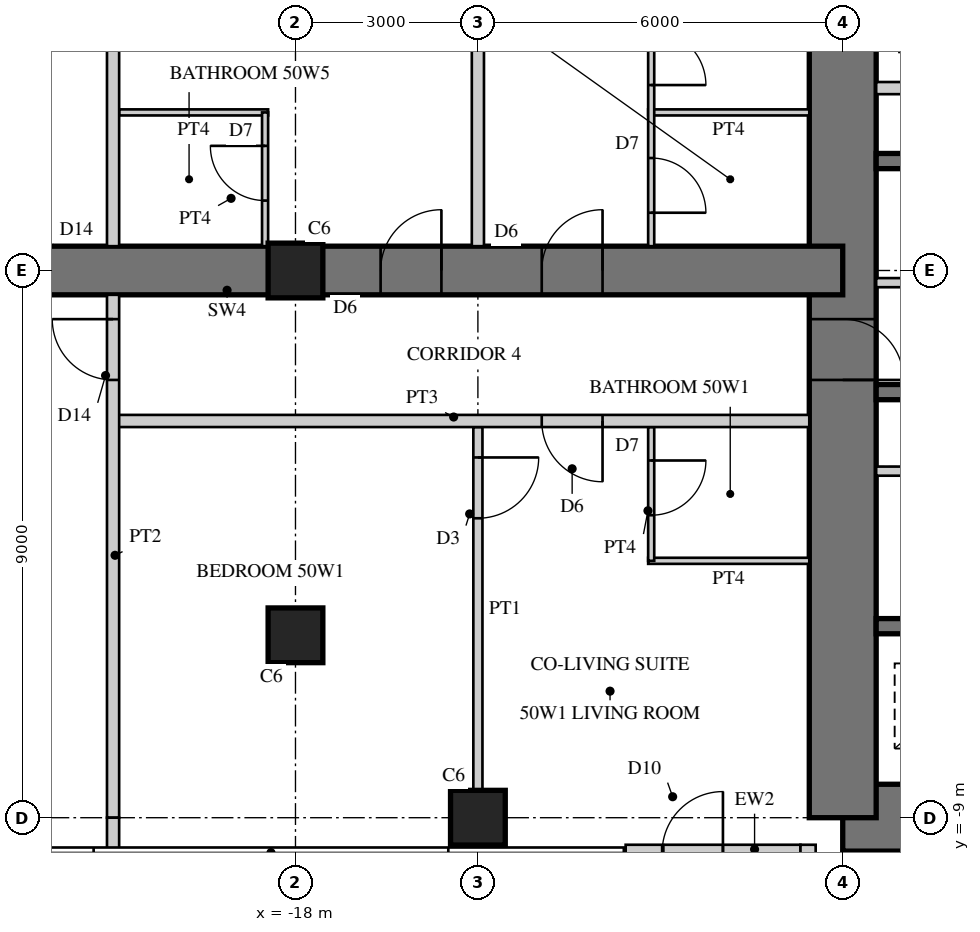
"""IFC4 building model, lengths in metres.
Left out: names, types, materials, properties, quantities, classifications, styles, units other than length and angle.
Written with IfcOpenShell. Run it as: python <this file> out.ifc"""

import sys

from ifc_helpers import new_model, si_unit, direction, frame, frame_2d, origin, origin_2d, place, context, subcontext, project, spatial, rectangle, hollow_rectangle, extrude, element, fill, save


model = new_model("IFC4")
c1 = context("Model", 3, precision=1e-05, world=origin(), true_north=direction((0.0, 1.0)))
c2 = subcontext(c1, "Body", "Model", "MODEL_VIEW")
j1 = project(units=[si_unit("LENGTHUNIT", "METRE"), si_unit("PLANEANGLEUNIT", "RADIAN")], contexts=[c1])
p1 = place(None, origin())
s1 = spatial("IfcSite", under=j1, at=p1, CompositionType="ELEMENT")
p2 = place(p1, origin())
s2 = spatial("IfcBuilding", under=s1, at=p2, CompositionType="ELEMENT")
p3 = place(p2, frame((0.0, 0.0, 200.1)))
s3 = spatial("IfcBuildingStorey", under=s2, at=p3, CompositionType="ELEMENT", Elevation=200.1)
p4 = place(p3, frame((-9.0, -9.0, 0.0), z_axis=(0.0, 0.0, 1.0), x_axis=(1.0, 0.0, 0.0)))
e1 = element("IfcWall", 1, at=p4, inside=s3, PredefinedType="SHEAR", context=c2, shape_type="SweptSolid", body=[
    extrude(rectangle(XDim=18.0, YDim=1.1, at=frame_2d((9.0, 0.0))), origin(), (0.0, 0.0, 1.0), 3.4),
])
p5 = place(p4, frame((9.8, 0.0, 0.0)))
e2 = element("IfcOpeningElement", 2, at=p5, cuts=e1, PredefinedType="OPENING", context=c2, shape_type="SweptSolid", body=[
    extrude(rectangle(XDim=1.0, YDim=2.4, at=frame_2d((0.5, 1.2))), frame((0.0, 0.56, 0.0), z_axis=(0.0, -1.0, 0.0), x_axis=(1.0, 0.0, 0.0)), (0.0, 0.0, 1.0), 1.12),
])
p6 = place(p3, frame((-9.0, 9.0, 0.0), z_axis=(0.0, 0.0, 1.0), x_axis=(0.0, -1.0, 0.0)))
e3 = element("IfcWall", 3, at=p6, inside=s3, PredefinedType="SHEAR", context=c2, shape_type="SweptSolid", body=[
    extrude(rectangle(XDim=18.0, YDim=1.1, at=frame_2d((9.0, 0.0))), origin(), (0.0, 0.0, 1.0), 3.4),
])
p7 = place(p6, frame((9.8, 0.0, 0.0)))
e4 = element("IfcOpeningElement", 4, at=p7, cuts=e3, PredefinedType="OPENING", context=c2, shape_type="SweptSolid", body=[
    extrude(rectangle(XDim=1.0, YDim=2.4, at=frame_2d((0.5, 1.2))), frame((0.0, 0.56, 0.0), z_axis=(0.0, -1.0, 0.0), x_axis=(1.0, 0.0, 0.0)), (0.0, 0.0, 1.0), 1.12),
])
p8 = place(p3, frame((-2.125, 1.8, 0.0), z_axis=(0.0, 0.0, 1.0), x_axis=(-1.0, 0.0, 0.0)))
e5 = element("IfcWall", 5, at=p8, inside=s3, PredefinedType="SHEAR", context=c2, shape_type="SweptSolid", body=[
    extrude(rectangle(XDim=6.325, YDim=0.25, at=frame_2d((3.163, 0.0))), origin(), (0.0, 0.0, 1.0), 3.4),
])
p9 = place(p3, frame((-5.725, 3.0, 0.0), z_axis=(0.0, 0.0, 1.0), x_axis=(-1.0, 0.0, 0.0)))
e6 = element("IfcWall", 6, at=p9, inside=s3, PredefinedType="PARTITIONING", context=c2, shape_type="SweptSolid", body=[
    extrude(rectangle(XDim=2.725, YDim=0.2, at=frame_2d((1.362, 0.0))), origin(), (0.0, 0.0, 1.0), 3.4),
])
p10 = place(p3, frame((-1.925, -2.0, 0.0), z_axis=(0.0, 0.0, 1.0), x_axis=(-1.0, 0.0, 0.0)))
e7 = element("IfcWall", 7, at=p10, inside=s3, PredefinedType="SHEAR", context=c2, shape_type="SweptSolid", body=[
    extrude(rectangle(XDim=6.525, YDim=0.25, at=frame_2d((3.262, 0.0))), origin(), (0.0, 0.0, 1.0), 3.4),
])
p11 = place(p3, frame((-1.925, -5.85, 0.0), z_axis=(0.0, 0.0, 1.0), x_axis=(-1.0, 0.0, 0.0)))
e8 = element("IfcWall", 8, at=p11, inside=s3, PredefinedType="SHEAR", context=c2, shape_type="SweptSolid", body=[
    extrude(rectangle(XDim=6.525, YDim=0.25, at=frame_2d((3.262, 0.0))), origin(), (0.0, 0.0, 1.0), 3.4),
])
p12 = place(p11, frame((0.471, 0.0, 0.0)))
e9 = element("IfcOpeningElement", 9, at=p12, cuts=e8, PredefinedType="OPENING", context=c2, shape_type="SweptSolid", body=[
    extrude(rectangle(XDim=1.1, YDim=2.2, at=frame_2d((0.55, 1.1))), frame((0.0, 0.135, 0.0), z_axis=(0.0, -1.0, 0.0), x_axis=(1.0, 0.0, 0.0)), (0.0, 0.0, 1.0), 0.27),
])
p13 = place(p11, frame((2.712, 0.0, 0.0)))
e10 = element("IfcOpeningElement", 10, at=p13, cuts=e8, PredefinedType="OPENING", context=c2, shape_type="SweptSolid", body=[
    extrude(rectangle(XDim=1.1, YDim=2.2, at=frame_2d((0.55, 1.1))), frame((0.0, 0.135, 0.0), z_axis=(0.0, -1.0, 0.0), x_axis=(1.0, 0.0, 0.0)), (0.0, 0.0, 1.0), 0.27),
])
p14 = place(p11, frame((4.954, 0.0, 0.0)))
e11 = element("IfcOpeningElement", 11, at=p14, cuts=e8, PredefinedType="OPENING", context=c2, shape_type="SweptSolid", body=[
    extrude(rectangle(XDim=1.1, YDim=2.2, at=frame_2d((0.55, 1.1))), frame((0.0, 0.135, 0.0), z_axis=(0.0, -1.0, 0.0), x_axis=(1.0, 0.0, 0.0)), (0.0, 0.0, 1.0), 0.27),
])
p15 = place(p3, frame((-1.925, -3.3, 0.0), z_axis=(0.0, 0.0, 1.0), x_axis=(-1.0, 0.0, 0.0)))
e12 = element("IfcWall", 12, at=p15, inside=s3, PredefinedType="PARTITIONING", context=c2, shape_type="SweptSolid", body=[
    extrude(rectangle(XDim=6.525, YDim=0.15, at=frame_2d((3.262, 0.0))), origin(), (0.0, 0.0, 1.0), 3.4),
])
p16 = place(p15, frame((0.075, 0.0, 0.0)))
e13 = element("IfcOpeningElement", 13, at=p16, cuts=e12, PredefinedType="OPENING", context=c2, shape_type="SweptSolid", body=[
    extrude(rectangle(XDim=0.8, YDim=2.1, at=frame_2d((0.4, 1.05))), frame((0.0, 0.085, 0.0), z_axis=(0.0, -1.0, 0.0), x_axis=(1.0, 0.0, 0.0)), (0.0, 0.0, 1.0), 0.17),
])
p17 = place(p15, frame((3.675, 0.0, 0.0)))
e14 = element("IfcOpeningElement", 14, at=p17, cuts=e12, PredefinedType="OPENING", context=c2, shape_type="SweptSolid", body=[
    extrude(rectangle(XDim=0.8, YDim=2.1, at=frame_2d((0.4, 1.05))), frame((0.0, 0.085, 0.0), z_axis=(0.0, -1.0, 0.0), x_axis=(1.0, 0.0, 0.0)), (0.0, 0.0, 1.0), 0.17),
])
p18 = place(p3, frame((-9.0, 0.0, 0.0), z_axis=(0.0, 0.0, 1.0), x_axis=(-1.0, 0.0, 0.0)))
e15 = element("IfcWall", 15, at=p18, inside=s3, PredefinedType="SHEAR", context=c2, shape_type="SweptSolid", body=[
    extrude(rectangle(XDim=18.0, YDim=0.8, at=frame_2d((9.0, 0.0))), origin(), (0.0, 0.0, 1.0), 3.4),
])
p19 = place(p18, frame((3.95, 0.0, 0.0)))
e16 = element("IfcOpeningElement", 16, at=p19, cuts=e15, PredefinedType="OPENING", context=c2, shape_type="SweptSolid", body=[
    extrude(rectangle(XDim=1.0, YDim=2.15, at=frame_2d((0.5, 1.075))), frame((0.0, 0.41, 0.0), z_axis=(0.0, -1.0, 0.0), x_axis=(1.0, 0.0, 0.0)), (0.0, 0.0, 1.0), 0.82),
])
p20 = place(p18, frame((6.6, 0.0, 0.0)))
e17 = element("IfcOpeningElement", 17, at=p20, cuts=e15, PredefinedType="OPENING", context=c2, shape_type="SweptSolid", body=[
    extrude(rectangle(XDim=1.0, YDim=2.15, at=frame_2d((0.5, 1.075))), frame((0.0, 0.41, 0.0), z_axis=(0.0, -1.0, 0.0), x_axis=(1.0, 0.0, 0.0)), (0.0, 0.0, 1.0), 0.82),
])
p21 = place(p18, frame((13.25, 0.0, 0.0)))
e18 = element("IfcOpeningElement", 18, at=p21, cuts=e15, PredefinedType="OPENING", context=c2, shape_type="SweptSolid", body=[
    extrude(rectangle(XDim=1.0, YDim=2.2, at=frame_2d((0.5, 1.1))), frame((0.0, 0.41, 0.0), z_axis=(0.0, -1.0, 0.0), x_axis=(1.0, 0.0, 0.0)), (0.0, 0.0, 1.0), 0.82),
])
for number, where, z_axis, x_axis in (
    (19, (-15.0, -9.0, 0.0), (0.0, 0.0, 1.0), (1.0, 0.0, 0.0)),
    (20, (-18.0, 0.0, 0.0), (0.0, 0.0, 1.0), (1.0, 0.0, 0.0)),
    (21, (-18.0, -6.0, 0.0), (0.0, 0.0, 1.0), (1.0, 0.0, 0.0)),
):
    element("IfcColumn", number, at=place(p3, frame(where, z_axis=z_axis, x_axis=x_axis)), inside=s3, PredefinedType="COLUMN", context=c2, shape_type="SweptSolid", body=[
        extrude(rectangle(XDim=0.9, YDim=0.9, at=origin_2d()), origin(), (0.0, 0.0, 1.0), 3.4),
    ])
p22 = place(p3, frame((-12.57, -9.57, 0.0), z_axis=(0.0, 0.0, 1.0), x_axis=(1.0, 0.0, 0.0)))
e22 = element("IfcWall", 22, at=p22, inside=s3, PredefinedType="SOLIDWALL", context=c2, shape_type="SweptSolid", body=[
    extrude(rectangle(XDim=2.875, YDim=0.25, at=frame_2d((1.438, 0.0))), origin(), (0.0, 0.0, 1.0), 3.22),
])
p23 = place(p22, frame((0.6, 0.0, 0.0)))
e23 = element("IfcOpeningElement", 23, at=p23, cuts=e22, PredefinedType="OPENING", context=c2, shape_type="SweptSolid", body=[
    extrude(rectangle(XDim=1.0, YDim=2.2, at=frame_2d((0.5, 1.1))), frame((0.0, 0.135, 0.0), z_axis=(0.0, -1.0, 0.0), x_axis=(1.0, 0.0, 0.0)), (0.0, 0.0, 1.0), 0.27),
])
p24 = place(p3, frame((-9.57, -9.445, 0.0), z_axis=(0.0, 0.0, 1.0), x_axis=(0.0, -1.0, 0.0)))
e24 = element("IfcWall", 24, at=p24, inside=s3, PredefinedType="SOLIDWALL", context=c2, shape_type="SweptSolid", body=[
    extrude(rectangle(XDim=3.125, YDim=0.25, at=frame_2d((1.562, 0.0))), origin(), (0.0, 0.0, 1.0), 3.22),
])
p25 = place(p24, frame((0.6, 0.0, 0.0)))
e25 = element("IfcOpeningElement", 25, at=p25, cuts=e24, PredefinedType="OPENING", context=c2, shape_type="SweptSolid", body=[
    extrude(rectangle(XDim=1.0, YDim=2.2, at=frame_2d((0.5, 1.1))), frame((0.0, 0.135, 0.0), z_axis=(0.0, -1.0, 0.0), x_axis=(1.0, 0.0, 0.0)), (0.0, 0.0, 1.0), 0.27),
])
p26 = place(p3, frame((-2.325, -0.2, 0.0), z_axis=(0.0, 0.0, 1.0), x_axis=(-1.0, 0.0, 0.0)))
e26 = element("IfcWall", 26, at=p26, inside=s3, PredefinedType="PARTITIONING", context=c2, shape_type="SweptSolid", body=[
    extrude(rectangle(XDim=6.125, YDim=0.15, at=frame_2d((3.062, 0.0))), origin(), (0.0, 0.0, 1.0), 3.22),
])
p27 = place(p26, frame((0.4, 0.0, 0.0)))
e27 = element("IfcOpeningElement", 27, at=p27, cuts=e26, PredefinedType="OPENING", context=c2, shape_type="SweptSolid", body=[
    extrude(rectangle(XDim=1.0, YDim=2.1, at=frame_2d((0.5, 1.05))), frame((0.0, 0.085, 0.0), z_axis=(0.0, -1.0, 0.0), x_axis=(1.0, 0.0, 0.0)), (0.0, 0.0, 1.0), 0.17),
])
p28 = place(p3, frame((-9.55, -4.775, 0.0), z_axis=(0.0, 0.0, 1.0), x_axis=(-1.0, 0.0, 0.0)))
e28 = element("IfcWall", 28, at=p28, inside=s3, PredefinedType="PARTITIONING", context=c2, shape_type="SweptSolid", body=[
    extrude(rectangle(XDim=2.65, YDim=0.1, at=frame_2d((1.325, 0.0))), origin(), (0.0, 0.0, 1.0), 3.22),
])
p29 = place(p3, frame((-12.15, -2.575, 0.0), z_axis=(0.0, 0.0, 1.0), x_axis=(0.0, -1.0, 0.0)))
e29 = element("IfcWall", 29, at=p29, inside=s3, PredefinedType="PARTITIONING", context=c2, shape_type="SweptSolid", body=[
    extrude(rectangle(XDim=2.2, YDim=0.1, at=frame_2d((1.1, 0.0))), origin(), (0.0, 0.0, 1.0), 3.22),
])
p30 = place(p29, frame((0.55, 0.0, 0.0)))
e30 = element("IfcOpeningElement", 30, at=p30, cuts=e29, PredefinedType="OPENING", context=c2, shape_type="SweptSolid", body=[
    extrude(rectangle(XDim=0.9, YDim=2.1, at=frame_2d((0.45, 1.05))), frame((0.0, 0.06, 0.0), z_axis=(0.0, -1.0, 0.0), x_axis=(1.0, 0.0, 0.0)), (0.0, 0.0, 1.0), 0.12),
])
p31 = place(p3, frame((-15.0, -2.575, 0.0), z_axis=(0.0, 0.0, 1.0), x_axis=(0.0, -1.0, 0.0)))
e31 = element("IfcWall", 31, at=p31, inside=s3, PredefinedType="PARTITIONING", context=c2, shape_type="SweptSolid", body=[
    extrude(rectangle(XDim=5.975, YDim=0.15, at=frame_2d((2.988, 0.0))), origin(), (0.0, 0.0, 1.0), 2.47),
])
p32 = place(p31, frame((0.5, 0.0, 0.0)))
e32 = element("IfcOpeningElement", 32, at=p32, cuts=e31, PredefinedType="OPENING", context=c2, shape_type="SweptSolid", body=[
    extrude(rectangle(XDim=1.0, YDim=2.1, at=frame_2d((0.5, 1.05))), frame((0.0, 0.085, 0.0), z_axis=(0.0, -1.0, 0.0), x_axis=(1.0, 0.0, 0.0)), (0.0, 0.0, 1.0), 0.17),
])
p33 = place(p3, frame((-9.55, 2.6, 0.0), z_axis=(0.0, 0.0, 1.0), x_axis=(-1.0, 0.0, 0.0)))
e33 = element("IfcWall", 33, at=p33, inside=s3, PredefinedType="PARTITIONING", context=c2, shape_type="SweptSolid", body=[
    extrude(rectangle(XDim=2.65, YDim=0.1, at=frame_2d((1.325, 0.0))), origin(), (0.0, 0.0, 1.0), 3.22),
])
p34 = place(p3, frame((-12.15, 9.445, 0.0), z_axis=(0.0, 0.0, 1.0), x_axis=(0.0, -1.0, 0.0)))
e34 = element("IfcWall", 34, at=p34, inside=s3, PredefinedType="PARTITIONING", context=c2, shape_type="SweptSolid", body=[
    extrude(rectangle(XDim=9.045, YDim=0.1, at=frame_2d((4.522, 0.0))), origin(), (0.0, 0.0, 1.0), 3.22),
])
p35 = place(p34, frame((5.495, 0.0, 0.0)))
e35 = element("IfcOpeningElement", 35, at=p35, cuts=e34, PredefinedType="OPENING", context=c2, shape_type="SweptSolid", body=[
    extrude(rectangle(XDim=0.9, YDim=2.1, at=frame_2d((0.45, 1.05))), frame((0.0, 0.06, 0.0), z_axis=(0.0, -1.0, 0.0), x_axis=(1.0, 0.0, 0.0)), (0.0, 0.0, 1.0), 0.12),
])
p36 = place(p34, frame((7.595, 0.0, 0.0)))
e36 = element("IfcOpeningElement", 36, at=p36, cuts=e34, PredefinedType="OPENING", context=c2, shape_type="SweptSolid", body=[
    extrude(rectangle(XDim=0.9, YDim=2.1, at=frame_2d((0.45, 1.05))), frame((0.0, 0.06, 0.0), z_axis=(0.0, -1.0, 0.0), x_axis=(1.0, 0.0, 0.0)), (0.0, 0.0, 1.0), 0.12),
])
p37 = place(p3, frame((-15.0, 8.55, 0.0), z_axis=(0.0, 0.0, 1.0), x_axis=(0.0, -1.0, 0.0)))
e37 = element("IfcWall", 37, at=p37, inside=s3, PredefinedType="SOLIDWALL", context=c2, shape_type="SweptSolid", body=[
    extrude(rectangle(XDim=8.15, YDim=0.2, at=frame_2d((4.075, 0.0))), origin(), (0.0, 0.0, 1.0), 2.47),
])
p38 = place(p3, frame((-18.45, 2.6, 0.0), z_axis=(0.0, 0.0, 1.0), x_axis=(-1.0, 0.0, 0.0)))
e38 = element("IfcWall", 38, at=p38, inside=s3, PredefinedType="PARTITIONING", context=c2, shape_type="SweptSolid", body=[
    extrude(rectangle(XDim=2.45, YDim=0.1, at=frame_2d((1.225, 0.0))), origin(), (0.0, 0.0, 1.0), 3.22),
])
p39 = place(p3, frame((-18.5, 2.6, 0.0), z_axis=(0.0, 0.0, 1.0), x_axis=(0.0, -1.0, 0.0)))
e39 = element("IfcWall", 39, at=p39, inside=s3, PredefinedType="PARTITIONING", context=c2, shape_type="SweptSolid", body=[
    extrude(rectangle(XDim=2.2, YDim=0.1, at=frame_2d((1.1, 0.0))), origin(), (0.0, 0.0, 1.0), 3.22),
])
p40 = place(p39, frame((0.55, 0.0, 0.0)))
e40 = element("IfcOpeningElement", 40, at=p40, cuts=e39, PredefinedType="OPENING", context=c2, shape_type="SweptSolid", body=[
    extrude(rectangle(XDim=0.9, YDim=2.1, at=frame_2d((0.45, 1.05))), frame((0.0, 0.06, 0.0), z_axis=(0.0, -1.0, 0.0), x_axis=(1.0, 0.0, 0.0)), (0.0, 0.0, 1.0), 0.12),
])
p41 = place(p3, frame((-9.55, -2.475, 0.0), z_axis=(0.0, 0.0, 1.0), x_axis=(-1.0, 0.0, 0.0)))
e41 = element("IfcWall", 41, at=p41, inside=s3, PredefinedType="SOLIDWALL", context=c2, shape_type="SweptSolid", body=[
    extrude(rectangle(XDim=11.45, YDim=0.2, at=frame_2d((5.725, 0.0))), origin(), (0.0, 0.0, 1.0), 3.22),
])
p42 = place(p41, frame((3.4, 0.0, 0.0)))
e42 = element("IfcOpeningElement", 42, at=p42, cuts=e41, PredefinedType="OPENING", context=c2, shape_type="SweptSolid", body=[
    extrude(rectangle(XDim=1.0, YDim=2.15, at=frame_2d((0.5, 1.075))), frame((0.0, 0.11, 0.0), z_axis=(0.0, -1.0, 0.0), x_axis=(1.0, 0.0, 0.0)), (0.0, 0.0, 1.0), 0.22),
])
p43 = place(p3, frame((-21.0, 9.0, 0.0), z_axis=(0.0, 0.0, 1.0), x_axis=(0.0, -1.0, 0.0)))
e43 = element("IfcWall", 43, at=p43, inside=s3, PredefinedType="SOLIDWALL", context=c2, shape_type="SweptSolid", body=[
    extrude(rectangle(XDim=8.6, YDim=0.2, at=frame_2d((4.3, 0.0))), origin(), (0.0, 0.0, 1.0), 2.62),
])
p44 = place(p3, frame((-21.0, -0.4, 0.0), z_axis=(0.0, 0.0, 1.0), x_axis=(0.0, -1.0, 0.0)))
e44 = element("IfcWall", 44, at=p44, inside=s3, PredefinedType="SOLIDWALL", context=c2, shape_type="SweptSolid", body=[
    extrude(rectangle(XDim=8.6, YDim=0.2, at=frame_2d((4.3, 0.0))), origin(), (0.0, 0.0, 1.0), 2.62),
])
p45 = place(p44, frame((0.4, 0.0, 0.0)))
e45 = element("IfcOpeningElement", 45, at=p45, cuts=e44, PredefinedType="OPENING", context=c2, shape_type="SweptSolid", body=[
    extrude(rectangle(XDim=1.0, YDim=2.2, at=frame_2d((0.5, 1.1))), frame((0.0, 0.11, 0.0), z_axis=(0.0, -1.0, 0.0), x_axis=(1.0, 0.0, 0.0)), (0.0, 0.0, 1.0), 0.22),
])
p46 = place(p3, frame((-21.0, -9.0, 0.0), z_axis=(0.0, 0.0, 1.0), x_axis=(0.0, -1.0, 0.0)))
e46 = element("IfcWall", 46, at=p46, inside=s3, PredefinedType="SOLIDWALL", context=c2, shape_type="SweptSolid", body=[
    extrude(rectangle(XDim=0.53, YDim=0.2, at=frame_2d((0.265, 0.0))), origin(), (0.0, 0.0, 1.0), 3.22),
])
p47 = place(p23, origin())
e47 = element("IfcDoor", 47, at=p47, inside=s3, OperationType="SINGLE_SWING_RIGHT", PredefinedType="DOOR", context=c2, shape_type="SweptSolid", body=[
    extrude(hollow_rectangle(XDim=1.0, YDim=2.2, WallThickness=0.06, at=frame_2d((0.5, 1.1))), frame((0.0, 0.025, 0.0), z_axis=(0.0, -1.0, 0.0), x_axis=(1.0, 0.0, 0.0)), (0.0, 0.0, 1.0), 0.05),
    extrude(rectangle(XDim=0.879, YDim=2.079, at=frame_2d((0.5, 1.1))), frame((0.0, 0.025, 0.0), z_axis=(0.0, -1.0, 0.0), x_axis=(1.0, 0.0, 0.0)), (0.0, 0.0, 1.0), 0.05),
])
fill(e23, e47)
p48 = place(p30, origin())
e48 = element("IfcDoor", 48, at=p48, inside=s3, OperationType="SINGLE_SWING_LEFT", PredefinedType="DOOR", context=c2, shape_type="SweptSolid", body=[
    extrude(rectangle(XDim=0.9, YDim=2.1, at=frame_2d((0.45, 1.05))), frame((0.0, 0.025, 0.0), z_axis=(0.0, -1.0, 0.0), x_axis=(1.0, 0.0, 0.0)), (0.0, 0.0, 1.0), 0.05),
])
fill(e30, e48)
p49 = place(p32, origin())
e49 = element("IfcDoor", 49, at=p49, inside=s3, OperationType="SINGLE_SWING_LEFT", PredefinedType="DOOR", context=c2, shape_type="SweptSolid", body=[
    extrude(rectangle(XDim=1.0, YDim=2.1, at=frame_2d((0.5, 1.05))), frame((0.0, 0.025, 0.0), z_axis=(0.0, -1.0, 0.0), x_axis=(1.0, 0.0, 0.0)), (0.0, 0.0, 1.0), 0.05),
])
fill(e32, e49)
p50 = place(p35, origin())
e50 = element("IfcDoor", 50, at=p50, inside=s3, OperationType="SINGLE_SWING_RIGHT", PredefinedType="DOOR", context=c2, shape_type="SweptSolid", body=[
    extrude(rectangle(XDim=0.9, YDim=2.1, at=frame_2d((0.45, 1.05))), frame((0.0, 0.025, 0.0), z_axis=(0.0, -1.0, 0.0), x_axis=(1.0, 0.0, 0.0)), (0.0, 0.0, 1.0), 0.05),
])
fill(e35, e50)
p51 = place(p36, origin())
e51 = element("IfcDoor", 51, at=p51, inside=s3, OperationType="SINGLE_SWING_RIGHT", PredefinedType="DOOR", context=c2, shape_type="SweptSolid", body=[
    extrude(rectangle(XDim=0.9, YDim=2.1, at=frame_2d((0.45, 1.05))), frame((0.0, 0.025, 0.0), z_axis=(0.0, -1.0, 0.0), x_axis=(1.0, 0.0, 0.0)), (0.0, 0.0, 1.0), 0.05),
])
fill(e36, e51)
p52 = place(p40, frame((0.9, 0.0, 0.0), z_axis=(0.0, 0.0, 1.0), x_axis=(-1.0, 0.0, 0.0)))
e52 = element("IfcDoor", 52, at=p52, inside=s3, OperationType="SINGLE_SWING_RIGHT", PredefinedType="DOOR", context=c2, shape_type="SweptSolid", body=[
    extrude(rectangle(XDim=0.9, YDim=2.1, at=frame_2d((0.45, 1.05))), frame((0.0, 0.025, 0.0), z_axis=(0.0, -1.0, 0.0), x_axis=(1.0, 0.0, 0.0)), (0.0, 0.0, 1.0), 0.05),
])
fill(e40, e52)
p53 = place(p42, origin())
e53 = element("IfcDoor", 53, at=p53, inside=s3, OperationType="SINGLE_SWING_LEFT", PredefinedType="DOOR", context=c2, shape_type="SweptSolid", body=[
    extrude(rectangle(XDim=1.0, YDim=2.15, at=frame_2d((0.5, 1.075))), frame((0.0, 0.025, 0.0), z_axis=(0.0, -1.0, 0.0), x_axis=(1.0, 0.0, 0.0)), (0.0, 0.0, 1.0), 0.05),
])
fill(e42, e53)
p54 = place(p45, frame((1.0, 0.0, 0.0), z_axis=(0.0, 0.0, 1.0), x_axis=(-1.0, 0.0, 0.0)))
e54 = element("IfcDoor", 54, at=p54, inside=s3, OperationType="SINGLE_SWING_RIGHT", PredefinedType="DOOR", context=c2, shape_type="SweptSolid", body=[
    extrude(rectangle(XDim=1.0, YDim=2.2, at=frame_2d((0.5, 1.1))), frame((0.0, 0.025, 0.0), z_axis=(0.0, -1.0, 0.0), x_axis=(1.0, 0.0, 0.0)), (0.0, 0.0, 1.0), 0.05),
])
fill(e45, e54)
p55 = place(p19, frame((1.0, 0.0, 0.0), z_axis=(0.0, 0.0, 1.0), x_axis=(-1.0, 0.0, 0.0)))
e55 = element("IfcDoor", 55, at=p55, inside=s3, OperationType="SINGLE_SWING_RIGHT", PredefinedType="DOOR", context=c2, shape_type="SweptSolid", body=[
    extrude(rectangle(XDim=1.0, YDim=2.15, at=frame_2d((0.5, 1.075))), frame((0.0, 0.025, 0.0), z_axis=(0.0, -1.0, 0.0), x_axis=(1.0, 0.0, 0.0)), (0.0, 0.0, 1.0), 0.05),
])
fill(e16, e55)
p56 = place(p20, frame((1.0, 0.0, 0.0), z_axis=(0.0, 0.0, 1.0), x_axis=(-1.0, 0.0, 0.0)))
e56 = element("IfcDoor", 56, at=p56, inside=s3, OperationType="SINGLE_SWING_RIGHT", PredefinedType="DOOR", context=c2, shape_type="SweptSolid", body=[
    extrude(rectangle(XDim=1.0, YDim=2.15, at=frame_2d((0.5, 1.075))), frame((0.0, 0.025, 0.0), z_axis=(0.0, -1.0, 0.0), x_axis=(1.0, 0.0, 0.0)), (0.0, 0.0, 1.0), 0.05),
])
fill(e17, e56)
p57 = place(p7, origin())
e57 = element("IfcDoor", 57, at=p57, inside=s3, OperationType="SINGLE_SWING_RIGHT", PredefinedType="DOOR", context=c2, shape_type="SweptSolid", body=[
    extrude(rectangle(XDim=1.0, YDim=2.4, at=frame_2d((0.5, 1.2))), frame((0.0, 0.055, 0.0), z_axis=(0.0, -1.0, 0.0), x_axis=(1.0, 0.0, 0.0)), (0.0, 0.0, 1.0), 0.05),
])
fill(e4, e57)
save(model, sys.argv[1])
